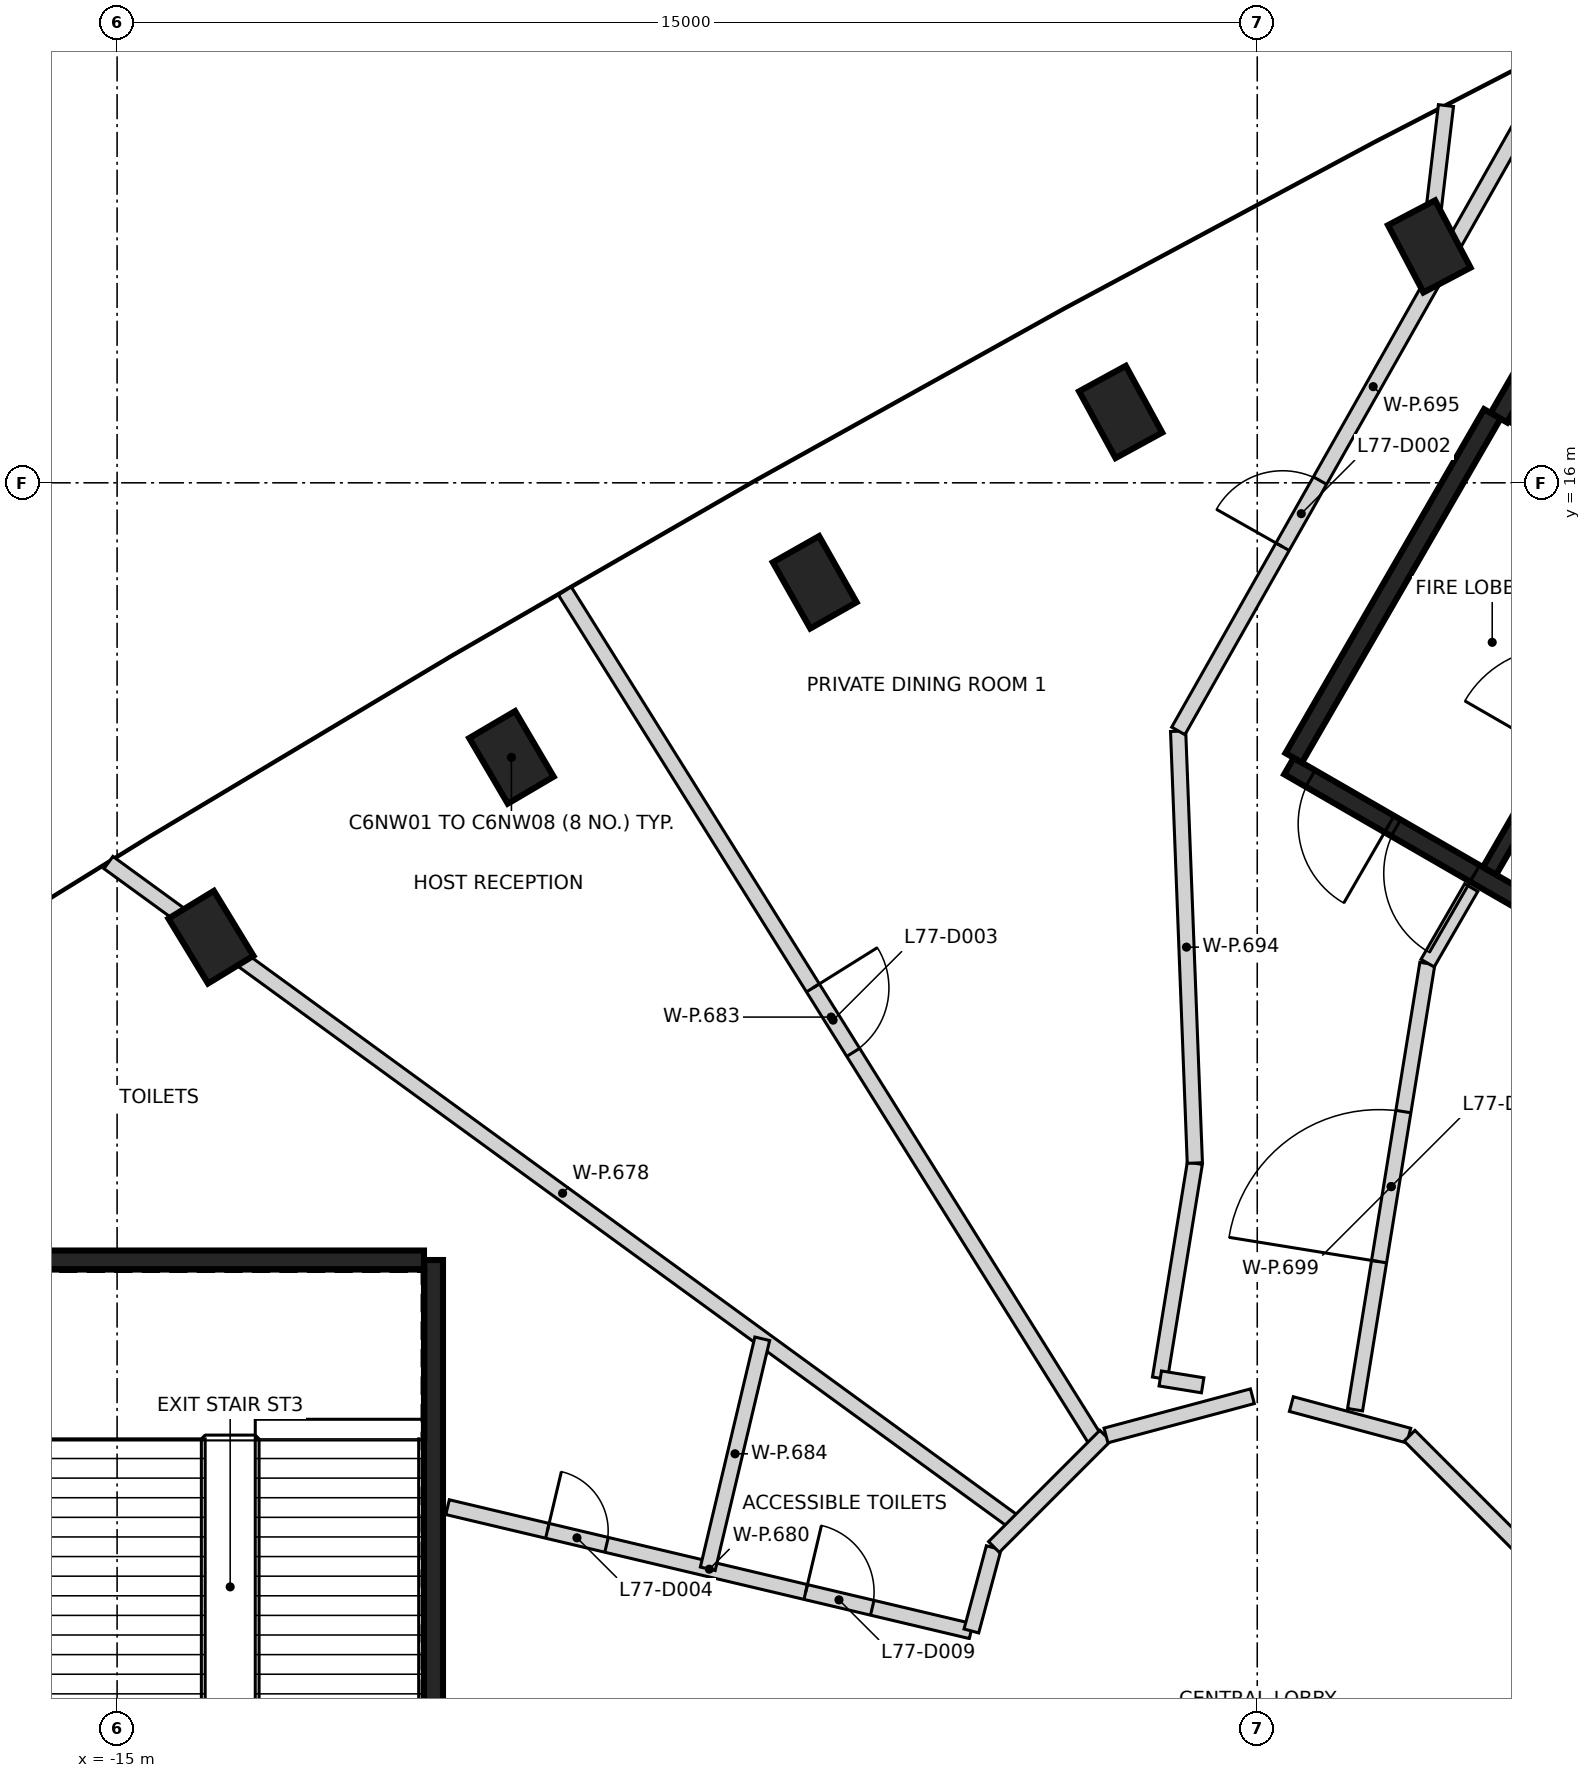
"""IFC4 building model, lengths in metres.
Left out: names, types, materials, properties, quantities, classifications, styles, units other than length and angle.
Written with IfcOpenShell. Run it as: python <this file> out.ifc"""

import sys

from ifc_helpers import new_model, si_unit, direction, frame, frame_2d, origin, origin_2d, place, context, subcontext, project, spatial, rectangle, extrude, element, fill, save


model = new_model("IFC4")
c1 = context("Model", 3, precision=1e-05, world=origin(), true_north=direction((0.0, 1.0)))
c2 = subcontext(c1, "Body", "Model", "MODEL_VIEW")
j1 = project(units=[si_unit("LENGTHUNIT", "METRE"), si_unit("PLANEANGLEUNIT", "RADIAN")], contexts=[c1])
p1 = place(None, origin())
s1 = spatial("IfcSite", under=j1, at=p1, CompositionType="ELEMENT")
p2 = place(p1, origin())
s2 = spatial("IfcBuilding", under=s1, at=p2, CompositionType="ELEMENT")
p3 = place(p2, frame((0.0, 0.0, 306.6)))
s3 = spatial("IfcBuildingStorey", under=s2, at=p3, CompositionType="ELEMENT", Elevation=306.6)
for number, where, z_axis, x_axis in (
    (1, (2.263, 19.11, -0.35), (0.0, 0.0, 1.0), (-0.466, 0.885, 0.0)),
    (2, (-1.797, 16.932, -0.35), (0.0, 0.0, 1.0), (-0.479, 0.878, 0.0)),
    (3, (-5.822, 14.691, -0.35), (0.0, 0.0, 1.0), (-0.493, 0.87, 0.0)),
    (4, (-9.812, 12.388, -0.35), (0.0, 0.0, 1.0), (-0.507, 0.862, 0.0)),
    (5, (-13.765, 10.022, -0.35), (0.0, 0.0, 1.0), (-0.52, 0.854, 0.0)),
):
    element("IfcColumn", number, at=place(p3, frame(where, z_axis=z_axis, x_axis=x_axis)), inside=s3, PredefinedType="COLUMN", context=c2, shape_type="SweptSolid", body=[
        extrude(rectangle(XDim=1.0, YDim=0.7, at=origin_2d()), origin(), (0.0, 0.0, 1.0), 6.0),
    ])
p4 = place(p3, frame((-10.837, 5.775, 0.0), z_axis=(0.0, 0.0, 1.0), x_axis=(0.0, -1.0, 0.0)))
e6 = element("IfcWall", 6, at=p4, inside=s3, PredefinedType="SHEAR", context=c2, shape_type="SweptSolid", body=[
    extrude(rectangle(XDim=11.55, YDim=0.25, at=frame_2d((5.775, 0.0))), origin(), (0.0, 0.0, 1.0), 5.65),
])
p5 = place(p4, frame((10.025, 0.0, 0.0)))
e7 = element("IfcOpeningElement", 7, at=p5, cuts=e6, PredefinedType="OPENING", context=c2, shape_type="SweptSolid", body=[
    extrude(rectangle(XDim=1.2, YDim=2.1, at=frame_2d((0.6, 1.05))), frame((0.0, 0.135, 0.0), z_axis=(0.0, -1.0, 0.0), x_axis=(1.0, 0.0, 0.0)), (0.0, 0.0, 1.0), 0.27),
])
p6 = place(p4, frame((8.725, 0.0, 0.0)))
e8 = element("IfcOpeningElement", 8, at=p6, cuts=e6, PredefinedType="OPENING", context=c2, shape_type="SweptSolid", body=[
    extrude(rectangle(XDim=1.2, YDim=2.1, at=frame_2d((0.6, 1.05))), frame((0.0, 0.135, 0.0), z_axis=(0.0, -1.0, 0.0), x_axis=(1.0, 0.0, 0.0)), (0.0, 0.0, 1.0), 0.27),
])
p7 = place(p3, frame((-16.472, 5.775, 0.0), z_axis=(0.0, 0.0, 1.0), x_axis=(1.0, 0.0, 0.0)))
e9 = element("IfcWall", 9, at=p7, inside=s3, PredefinedType="SHEAR", context=c2, shape_type="SweptSolid", body=[
    extrude(rectangle(XDim=5.51, YDim=0.25, at=frame_2d((2.755, 0.0))), origin(), (0.0, 0.0, 1.0), 5.65),
])
p8 = place(p3, frame((10.42, 6.498, 0.0), z_axis=(0.0, 0.0, 1.0), x_axis=(-0.866021906294, 0.500006057782, 0.0)))
e10 = element("IfcWall", 10, at=p8, inside=s3, PredefinedType="SHEAR", context=c2, shape_type="SweptSolid", body=[
    extrude(rectangle(XDim=11.55, YDim=0.25, at=frame_2d((5.775, 0.0))), origin(), (0.0, 0.0, 1.0), 5.65),
])
p9 = place(p8, frame((10.025, 0.0, 0.0)))
e11 = element("IfcOpeningElement", 11, at=p9, cuts=e10, PredefinedType="OPENING", context=c2, shape_type="SweptSolid", body=[
    extrude(rectangle(XDim=1.2, YDim=2.1, at=frame_2d((0.6, 1.05))), frame((0.0, 0.135, 0.0), z_axis=(0.0, -1.0, 0.0), x_axis=(1.0, 0.0, 0.0)), (0.0, 0.0, 1.0), 0.27),
])
p10 = place(p8, frame((8.725, 0.0, 0.0)))
e12 = element("IfcOpeningElement", 12, at=p10, cuts=e10, PredefinedType="OPENING", context=c2, shape_type="SweptSolid", body=[
    extrude(rectangle(XDim=1.2, YDim=2.1, at=frame_2d((0.6, 1.05))), frame((0.0, 0.135, 0.0), z_axis=(0.0, -1.0, 0.0), x_axis=(1.0, 0.0, 0.0)), (0.0, 0.0, 1.0), 0.27),
])
p11 = place(p3, frame((3.179, 16.856, 0.0), z_axis=(0.0, 0.0, 1.0), x_axis=(0.500001955336, 0.866024274868, 0.0)))
e13 = element("IfcWall", 13, at=p11, inside=s3, PredefinedType="SHEAR", context=c2, shape_type="SweptSolid", body=[
    extrude(rectangle(XDim=6.125, YDim=0.25, at=frame_2d((3.062, 0.0))), origin(), (0.0, 0.0, 1.0), 5.65),
])
p12 = place(p11, frame((3.563, 0.0, 0.0)))
e14 = element("IfcOpeningElement", 14, at=p12, cuts=e13, PredefinedType="OPENING", context=c2, shape_type="SweptSolid", body=[
    extrude(rectangle(XDim=1.0, YDim=2.1, at=frame_2d((0.5, 1.05))), frame((0.0, 0.135, 0.0), z_axis=(0.0, -1.0, 0.0), x_axis=(1.0, 0.0, 0.0)), (0.0, 0.0, 1.0), 0.27),
])
p13 = place(p3, frame((0.48, 12.381, 0.0), z_axis=(0.0, 0.0, 1.0), x_axis=(0.49999885962, 0.866026062182, 0.0)))
e15 = element("IfcWall", 15, at=p13, inside=s3, PredefinedType="SHEAR", context=c2, shape_type="SweptSolid", body=[
    extrude(rectangle(XDim=5.225, YDim=0.25, at=frame_2d((2.612, 0.0))), origin(), (0.0, 0.0, 1.0), 5.65),
])
p14 = place(p3, frame((3.057, 10.895, 0.0), z_axis=(0.0, 0.0, 1.0), x_axis=(0.500027839223, 0.866009330205, 0.0)))
e16 = element("IfcWall", 16, at=p14, inside=s3, PredefinedType="SHEAR", context=c2, shape_type="SweptSolid", body=[
    extrude(rectangle(XDim=5.098, YDim=0.2, at=frame_2d((2.549, 0.0))), origin(), (0.0, 0.0, 1.0), 5.65),
])
p15 = place(p14, frame((1.774, 0.0, 0.0)))
e17 = element("IfcOpeningElement", 17, at=p15, cuts=e16, PredefinedType="OPENING", context=c2, shape_type="SweptSolid", body=[
    extrude(rectangle(XDim=1.4, YDim=2.1, at=frame_2d((0.7, 1.05))), frame((0.0, 0.11, 0.0), z_axis=(0.0, -1.0, 0.0), x_axis=(1.0, 0.0, 0.0)), (0.0, 0.0, 1.0), 0.22),
])
p16 = place(p3, frame((5.646, 15.576, 0.0), z_axis=(0.0, 0.0, 1.0), x_axis=(-0.866018407898, 0.500012117035, 0.0)))
e18 = element("IfcWall", 18, at=p16, inside=s3, PredefinedType="SHEAR", context=c2, shape_type="SweptSolid", body=[
    extrude(rectangle(XDim=2.651, YDim=0.2, at=frame_2d((1.325, 0.0))), origin(), (0.0, 0.0, 1.0), 5.65),
])
p17 = place(p16, frame((0.652, 0.0, 0.0)))
e19 = element("IfcOpeningElement", 19, at=p17, cuts=e18, PredefinedType="OPENING", context=c2, shape_type="SweptSolid", body=[
    extrude(rectangle(XDim=1.3, YDim=2.1, at=frame_2d((0.65, 1.05))), frame((0.0, 0.11, 0.0), z_axis=(0.0, -1.0, 0.0), x_axis=(1.0, 0.0, 0.0)), (0.0, 0.0, 1.0), 0.22),
])
p18 = place(p3, frame((-15.114, 11.004, 0.0), z_axis=(0.0, 0.0, 1.0), x_axis=(0.808410288659, -0.58861940606, 0.0)))
e20 = element("IfcWall", 20, at=p18, inside=s3, PredefinedType="PARTITIONING", context=c2, shape_type="SweptSolid", body=[
    extrude(rectangle(XDim=14.782, YDim=0.2, at=frame_2d((7.391, 0.0))), origin(), (0.0, 0.0, 1.0), 5.65),
])
p19 = place(p3, frame((-10.652, 2.524, 0.0), z_axis=(0.0, 0.0, 1.0), x_axis=(0.97307682679, -0.230480995236, 0.0)))
e21 = element("IfcWall", 21, at=p19, inside=s3, PredefinedType="PARTITIONING", context=c2, shape_type="SweptSolid", body=[
    extrude(rectangle(XDim=7.078, YDim=0.2, at=frame_2d((3.539, 0.0))), origin(), (0.0, 0.0, 1.0), 5.65),
])
p20 = place(p19, frame((1.349, 0.0, 0.0)))
e22 = element("IfcOpeningElement", 22, at=p20, cuts=e21, PredefinedType="OPENING", context=c2, shape_type="SweptSolid", body=[
    extrude(rectangle(XDim=0.8, YDim=2.1, at=frame_2d((0.4, 1.05))), frame((0.0, 0.11, 0.0), z_axis=(0.0, -1.0, 0.0), x_axis=(1.0, 0.0, 0.0)), (0.0, 0.0, 1.0), 0.22),
])
p21 = place(p19, frame((4.842, 0.0, 0.0)))
e23 = element("IfcOpeningElement", 23, at=p21, cuts=e21, PredefinedType="OPENING", context=c2, shape_type="SweptSolid", body=[
    extrude(rectangle(XDim=0.9, YDim=2.1, at=frame_2d((0.45, 1.05))), frame((0.0, 0.11, 0.0), z_axis=(0.0, -1.0, 0.0), x_axis=(1.0, 0.0, 0.0)), (0.0, 0.0, 1.0), 0.22),
])
p22 = place(p3, frame((-9.109, 14.577, 0.0), z_axis=(0.0, 0.0, 1.0), x_axis=(0.529975703245, -0.848012826536, 0.0)))
e24 = element("IfcWall", 24, at=p22, inside=s3, PredefinedType="PARTITIONING", context=c2, shape_type="SweptSolid", body=[
    extrude(rectangle(XDim=13.222, YDim=0.2, at=frame_2d((6.611, 0.0))), origin(), (0.0, 0.0, 1.0), 4.75),
])
p23 = place(p22, frame((6.158, 0.0, 0.0)))
e25 = element("IfcOpeningElement", 25, at=p23, cuts=e24, PredefinedType="OPENING", context=c2, shape_type="SweptSolid", body=[
    extrude(rectangle(XDim=1.0, YDim=2.1, at=frame_2d((0.5, 1.05))), frame((0.0, 0.11, 0.0), z_axis=(0.0, -1.0, 0.0), x_axis=(1.0, 0.0, 0.0)), (0.0, 0.0, 1.0), 0.22),
])
p24 = place(p3, frame((-7.229, 1.713, 0.0), z_axis=(0.0, 0.0, 1.0), x_axis=(0.230566147052, 0.973056653969, 0.0)))
e26 = element("IfcWall", 26, at=p24, inside=s3, PredefinedType="PARTITIONING", context=c2, shape_type="SweptSolid", body=[
    extrude(rectangle(XDim=3.11, YDim=0.2, at=frame_2d((1.555, 0.0))), origin(), (0.0, 0.0, 1.0), 5.65),
])
p25 = place(p3, frame((-3.761, 0.895, 0.0), z_axis=(0.0, 0.0, 1.0), x_axis=(0.25927065015, 0.965804705917, 0.0)))
e27 = element("IfcWall", 27, at=p25, inside=s3, PredefinedType="PARTITIONING", context=c2, shape_type="SweptSolid", body=[
    extrude(rectangle(XDim=1.134, YDim=0.2, at=frame_2d((0.567, 0.0))), origin(), (0.0, 0.0, 1.0), 5.65),
])
p26 = place(p3, frame((-3.464, 2.0, 0.0), z_axis=(0.0, 0.0, 1.0), x_axis=(0.707106781187, 0.707106781187, 0.0)))
e28 = element("IfcWall", 28, at=p26, inside=s3, PredefinedType="PARTITIONING", context=c2, shape_type="SweptSolid", body=[
    extrude(rectangle(XDim=2.071, YDim=0.2, at=frame_2d((1.035, 0.0))), origin(), (0.0, 0.0, 1.0), 5.65),
])
p27 = place(p3, frame((-1.99, 3.467, 0.0), z_axis=(0.0, 0.0, 1.0), x_axis=(0.965951876599, 0.258721804443, 0.0)))
e29 = element("IfcWall", 29, at=p27, inside=s3, PredefinedType="PARTITIONING", context=c2, shape_type="SweptSolid", body=[
    extrude(rectangle(XDim=1.994, YDim=0.2, at=frame_2d((0.997, 0.0))), origin(), (0.0, 0.0, 1.0), 5.65),
])
p28 = place(p3, frame((-1.28, 4.22, 0.0), z_axis=(0.0, 0.0, 1.0), x_axis=(0.160142941746, 0.987093834551, 0.0)))
e30 = element("IfcWall", 30, at=p28, inside=s3, PredefinedType="PARTITIONING", context=c2, shape_type="SweptSolid", body=[
    extrude(rectangle(XDim=2.866, YDim=0.2, at=frame_2d((1.433, 0.0))), origin(), (0.0, 0.0, 1.0), 5.65),
])
p29 = place(p3, frame((-1.276, 4.217, 0.0), z_axis=(0.0, 0.0, 1.0), x_axis=(0.987210430216, -0.159422603392, 0.0)))
e31 = element("IfcWall", 31, at=p29, inside=s3, PredefinedType="PARTITIONING", context=c2, shape_type="SweptSolid", body=[
    extrude(rectangle(XDim=0.565, YDim=0.2, at=frame_2d((0.283, 0.0))), origin(), (0.0, 0.0, 1.0), 5.65),
])
p30 = place(p3, frame((-1.041, 12.732, 0.0), z_axis=(0.0, 0.0, 1.0), x_axis=(0.038692050162, -0.999251182263, 0.0)))
e32 = element("IfcWall", 32, at=p30, inside=s3, PredefinedType="PARTITIONING", context=c2, shape_type="SweptSolid", body=[
    extrude(rectangle(XDim=5.685, YDim=0.2, at=frame_2d((2.843, 0.0))), origin(), (0.0, 0.0, 1.0), 5.65),
])
p31 = place(p3, frame((-1.039, 12.736, 0.0), z_axis=(0.0, 0.0, 1.0), x_axis=(0.492629053188, 0.870239401518, 0.0)))
e33 = element("IfcWall", 33, at=p31, inside=s3, PredefinedType="PARTITIONING", context=c2, shape_type="SweptSolid", body=[
    extrude(rectangle(XDim=10.409, YDim=0.2, at=frame_2d((5.205, 0.0))), origin(), (0.0, 0.0, 1.0), 4.75),
])
p32 = place(p31, frame((2.784, 0.0, 0.0)))
e34 = element("IfcOpeningElement", 34, at=p32, cuts=e33, PredefinedType="OPENING", context=c2, shape_type="SweptSolid", body=[
    extrude(rectangle(XDim=1.0, YDim=2.1, at=frame_2d((0.5, 1.05))), frame((0.0, 0.11, 0.0), z_axis=(0.0, -1.0, 0.0), x_axis=(1.0, 0.0, 0.0)), (0.0, 0.0, 1.0), 0.22),
])
p33 = place(p3, frame((0.449, 3.88, 0.0), z_axis=(0.0, 0.0, 1.0), x_axis=(0.96579530644, -0.259305661448, 0.0)))
e35 = element("IfcWall", 35, at=p33, inside=s3, PredefinedType="PARTITIONING", context=c2, shape_type="SweptSolid", body=[
    extrude(rectangle(XDim=1.6, YDim=0.2, at=frame_2d((0.8, 0.0))), origin(), (0.0, 0.0, 1.0), 5.65),
])
p34 = place(p3, frame((1.287, 3.806, 0.0), z_axis=(0.0, 0.0, 1.0), x_axis=(0.159910062187, 0.987131587992, 0.0)))
e36 = element("IfcWall", 36, at=p34, inside=s3, PredefinedType="PARTITIONING", context=c2, shape_type="SweptSolid", body=[
    extrude(rectangle(XDim=5.947, YDim=0.2, at=frame_2d((2.973, 0.0))), origin(), (0.0, 0.0, 1.0), 5.65),
])
p35 = place(p34, frame((1.973, 0.0, 0.0)))
e37 = element("IfcOpeningElement", 37, at=p35, cuts=e36, PredefinedType="OPENING", context=c2, shape_type="SweptSolid", body=[
    extrude(rectangle(XDim=2.0, YDim=2.1, at=frame_2d((1.0, 1.05))), frame((0.0, 0.11, 0.0), z_axis=(0.0, -1.0, 0.0), x_axis=(1.0, 0.0, 0.0)), (0.0, 0.0, 1.0), 0.22),
])
p36 = place(p3, frame((2.004, 3.463, 0.0), z_axis=(0.0, 0.0, 1.0), x_axis=(0.707106781187, -0.707106781187, 0.0)))
e38 = element("IfcWall", 38, at=p36, inside=s3, PredefinedType="PARTITIONING", context=c2, shape_type="SweptSolid", body=[
    extrude(rectangle(XDim=2.063, YDim=0.2, at=frame_2d((1.032, 0.0))), origin(), (0.0, 0.0, 1.0), 5.65),
])
p37 = place(p3, frame((2.243, 18.939, 0.0), z_axis=(0.0, 0.0, 1.0), x_axis=(0.11751540525, 0.993071059657, 0.0)))
e39 = element("IfcWall", 39, at=p37, inside=s3, PredefinedType="PARTITIONING", context=c2, shape_type="SweptSolid", body=[
    extrude(rectangle(XDim=2.038, YDim=0.2, at=frame_2d((1.019, 0.0))), origin(), (0.0, 0.0, 1.0), 5.65),
])
p38 = place(p3, frame((2.241, 9.681, 0.0), z_axis=(0.0, 0.0, 1.0), x_axis=(0.500507931288, 0.865731950847, 0.0)))
e40 = element("IfcWall", 40, at=p38, inside=s3, PredefinedType="PARTITIONING", context=c2, shape_type="SweptSolid", body=[
    extrude(rectangle(XDim=1.148, YDim=0.2, at=frame_2d((0.574, 0.0))), origin(), (0.0, 0.0, 1.0), 5.65),
])
p39 = place(p9, origin())
e41 = element("IfcDoor", 41, at=p39, inside=s3, OperationType="SINGLE_SWING_LEFT", PredefinedType="DOOR", context=c2, shape_type="SweptSolid", body=[
    extrude(rectangle(XDim=1.2, YDim=2.1, at=frame_2d((0.6, 1.05))), frame((0.0, 0.025, 0.0), z_axis=(0.0, -1.0, 0.0), x_axis=(1.0, 0.0, 0.0)), (0.0, 0.0, 1.0), 0.05),
])
fill(e11, e41)
p40 = place(p10, origin())
e42 = element("IfcDoor", 42, at=p40, inside=s3, OperationType="SINGLE_SWING_RIGHT", PredefinedType="DOOR", context=c2, shape_type="SweptSolid", body=[
    extrude(rectangle(XDim=1.2, YDim=2.1, at=frame_2d((0.6, 1.05))), frame((0.0, 0.025, 0.0), z_axis=(0.0, -1.0, 0.0), x_axis=(1.0, 0.0, 0.0)), (0.0, 0.0, 1.0), 0.05),
])
fill(e12, e42)
p41 = place(p35, frame((2.0, 0.0, 0.0), z_axis=(0.0, 0.0, 1.0), x_axis=(-1.0, 0.0, 0.0)))
e43 = element("IfcDoor", 43, at=p41, inside=s3, OperationType="DOUBLE_DOOR_SINGLE_SWING", PredefinedType="DOOR", context=c2, shape_type="SweptSolid", body=[
    extrude(rectangle(XDim=2.0, YDim=2.1, at=frame_2d((1.0, 1.05))), frame((0.0, 0.025, 0.0), z_axis=(0.0, -1.0, 0.0), x_axis=(1.0, 0.0, 0.0)), (0.0, 0.0, 1.0), 0.05),
])
fill(e37, e43)
p42 = place(p32, origin())
e44 = element("IfcDoor", 44, at=p42, inside=s3, OperationType="SINGLE_SWING_LEFT", PredefinedType="DOOR", context=c2, shape_type="SweptSolid", body=[
    extrude(rectangle(XDim=1.0, YDim=2.1, at=frame_2d((0.5, 1.05))), frame((0.0, 0.025, 0.0), z_axis=(0.0, -1.0, 0.0), x_axis=(1.0, 0.0, 0.0)), (0.0, 0.0, 1.0), 0.05),
])
fill(e34, e44)
p43 = place(p23, frame((1.0, 0.0, 0.0), z_axis=(0.0, 0.0, 1.0), x_axis=(-1.0, 0.0, 0.0)))
e45 = element("IfcDoor", 45, at=p43, inside=s3, OperationType="SINGLE_SWING_LEFT", PredefinedType="DOOR", context=c2, shape_type="SweptSolid", body=[
    extrude(rectangle(XDim=1.0, YDim=2.1, at=frame_2d((0.5, 1.05))), frame((0.0, 0.025, 0.0), z_axis=(0.0, -1.0, 0.0), x_axis=(1.0, 0.0, 0.0)), (0.0, 0.0, 1.0), 0.05),
])
fill(e25, e45)
p44 = place(p20, frame((0.8, 0.0, 0.0), z_axis=(0.0, 0.0, 1.0), x_axis=(-1.0, 0.0, 0.0)))
e46 = element("IfcDoor", 46, at=p44, inside=s3, OperationType="SINGLE_SWING_LEFT", PredefinedType="DOOR", context=c2, shape_type="SweptSolid", body=[
    extrude(rectangle(XDim=0.8, YDim=2.1, at=frame_2d((0.4, 1.05))), frame((0.0, 0.025, 0.0), z_axis=(0.0, -1.0, 0.0), x_axis=(1.0, 0.0, 0.0)), (0.0, 0.0, 1.0), 0.05),
])
fill(e22, e46)
p45 = place(p21, origin())
e47 = element("IfcDoor", 47, at=p45, inside=s3, OperationType="SINGLE_SWING_LEFT", PredefinedType="DOOR", context=c2, shape_type="SweptSolid", body=[
    extrude(rectangle(XDim=0.9, YDim=2.1, at=frame_2d((0.45, 1.05))), frame((0.0, 0.025, 0.0), z_axis=(0.0, -1.0, 0.0), x_axis=(1.0, 0.0, 0.0)), (0.0, 0.0, 1.0), 0.05),
])
fill(e23, e47)
save(model, sys.argv[1])
